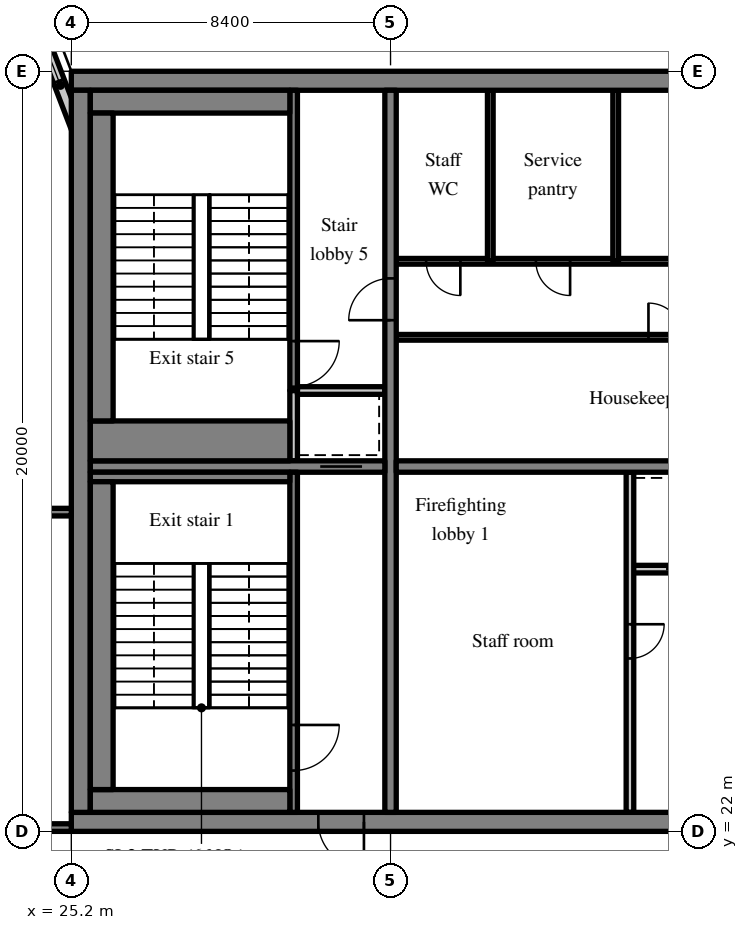
"""IFC4 building model, lengths in metres.
Left out: names, types, materials, properties, quantities, classifications, styles, units other than length and angle.
Written with IfcOpenShell. Run it as: python <this file> out.ifc"""

import sys

from ifc_helpers import new_model, si_unit, direction, frame, frame_2d, origin, place, context, subcontext, project, spatial, rectangle, extrude, source, transform, mapped, element, fill, save


model = new_model("IFC4")
c1 = context("Model", 3, precision=1e-05, world=origin(), true_north=direction((0.0, 1.0)))
c2 = subcontext(c1, "Body", "Model", "MODEL_VIEW")
j1 = project(units=[si_unit("LENGTHUNIT", "METRE"), si_unit("PLANEANGLEUNIT", "RADIAN")], contexts=[c1])
p1 = place(None, origin())
s1 = spatial("IfcSite", under=j1, at=p1, CompositionType="ELEMENT")
p2 = place(p1, origin())
s2 = spatial("IfcBuilding", under=s1, at=p2, CompositionType="ELEMENT")
p3 = place(p2, frame((0.0, 0.0, 281.7)))
s3 = spatial("IfcBuildingStorey", under=s2, at=p3, CompositionType="ELEMENT", Elevation=281.7)
m1 = source(origin(), c2, "Body", "SweptSolid", [
    extrude(rectangle(XDim=50.4, YDim=0.5, at=frame_2d((25.2, 0.0))), origin(), (0.0, 0.0, 1.0), 3.72),
])
p4 = place(p3, frame((25.2, 22.25, 0.0), z_axis=(0.0, 0.0, 1.0), x_axis=(1.0, 0.0, 0.0)))
e1 = element("IfcWall", 1, at=p4, inside=s3, PredefinedType="SHEAR", context=c2, shape_type="MappedRepresentation", body=[
    mapped(m1, transform((0.0, 0.0, 0.0), scale=1.0)),
])
m2 = source(origin(), c2, "Body", "SweptSolid", [
    extrude(rectangle(XDim=1.8, YDim=2.1, at=frame_2d((0.9, 1.05))), frame((0.0, 0.26, 0.0), z_axis=(0.0, -1.0, 0.0), x_axis=(1.0, 0.0, 0.0)), (0.0, 0.0, 1.0), 0.52),
])
p5 = place(p4, frame((15.9, 0.0, 0.0)))
e2 = element("IfcOpeningElement", 2, at=p5, cuts=e1, PredefinedType="OPENING", context=c2, shape_type="MappedRepresentation", body=[
    mapped(m2, transform((0.0, 0.0, 0.0), scale=1.0)),
])
m3 = source(origin(), c2, "Body", "SweptSolid", [
    extrude(rectangle(XDim=0.9, YDim=2.1, at=frame_2d((0.45, 1.05))), frame((0.0, 0.26, 0.0), z_axis=(0.0, -1.0, 0.0), x_axis=(1.0, 0.0, 0.0)), (0.0, 0.0, 1.0), 0.52),
])
p6 = place(p4, frame((21.525, 0.0, 0.0)))
e3 = element("IfcOpeningElement", 3, at=p6, cuts=e1, PredefinedType="OPENING", context=c2, shape_type="MappedRepresentation", body=[
    mapped(m3, transform((0.0, 0.0, 0.0), scale=1.0)),
])
p7 = place(p4, frame((32.7, 0.0, 0.0)))
e4 = element("IfcOpeningElement", 4, at=p7, cuts=e1, PredefinedType="OPENING", context=c2, shape_type="MappedRepresentation", body=[
    mapped(m2, transform((0.0, 0.0, 0.0), scale=1.0)),
])
m4 = source(origin(), c2, "Body", "SweptSolid", [
    extrude(rectangle(XDim=1.2, YDim=2.1, at=frame_2d((0.6, 1.05))), frame((0.0, 0.26, 0.0), z_axis=(0.0, -1.0, 0.0), x_axis=(1.0, 0.0, 0.0)), (0.0, 0.0, 1.0), 0.52),
])
p8 = place(p4, frame((6.5, 0.0, 0.0)))
e5 = element("IfcOpeningElement", 5, at=p8, cuts=e1, PredefinedType="OPENING", context=c2, shape_type="MappedRepresentation", body=[
    mapped(m4, transform((0.0, 0.0, 0.0), scale=1.0)),
])
p9 = place(p4, frame((47.975, 0.0, 0.0)))
e6 = element("IfcOpeningElement", 6, at=p9, cuts=e1, PredefinedType="OPENING", context=c2, shape_type="MappedRepresentation", body=[
    mapped(m4, transform((0.0, 0.0, 0.0), scale=1.0)),
])
p10 = place(p3, frame((25.2, 41.75, 0.0), z_axis=(0.0, 0.0, 1.0), x_axis=(1.0, 0.0, 0.0)))
e7 = element("IfcWall", 7, at=p10, inside=s3, PredefinedType="SHEAR", context=c2, shape_type="MappedRepresentation", body=[
    mapped(m1, transform((0.0, 0.0, 0.0), scale=1.0)),
])
m5 = source(origin(), c2, "Body", "SweptSolid", [
    extrude(rectangle(XDim=19.0, YDim=0.5, at=frame_2d((9.5, 0.0))), origin(), (0.0, 0.0, 1.0), 3.72),
])
p11 = place(p3, frame((25.45, 22.5, 0.0), z_axis=(0.0, 0.0, 1.0), x_axis=(0.0, 1.0, 0.0)))
e8 = element("IfcWall", 8, at=p11, inside=s3, PredefinedType="SHEAR", context=c2, shape_type="MappedRepresentation", body=[
    mapped(m5, transform((0.0, 0.0, 0.0), scale=1.0)),
])
m6 = source(origin(), c2, "Body", "SweptSolid", [
    extrude(rectangle(XDim=19.0, YDim=0.3, at=frame_2d((9.5, 0.0))), origin(), (0.0, 0.0, 1.0), 3.72),
])
p12 = place(p3, frame((33.6, 22.5, 0.0), z_axis=(0.0, 0.0, 1.0), x_axis=(0.0, 1.0, 0.0)))
e9 = element("IfcWall", 9, at=p12, inside=s3, PredefinedType="SHEAR", context=c2, shape_type="MappedRepresentation", body=[
    mapped(m6, transform((0.0, 0.0, 0.0), scale=1.0)),
])
m7 = source(origin(), c2, "Body", "SweptSolid", [
    extrude(rectangle(XDim=1.1, YDim=2.1, at=frame_2d((0.55, 1.05))), frame((0.0, 0.16, 0.0), z_axis=(0.0, -1.0, 0.0), x_axis=(1.0, 0.0, 0.0)), (0.0, 0.0, 1.0), 0.32),
])
p13 = place(p12, frame((12.95, 0.0, 0.0)))
e10 = element("IfcOpeningElement", 10, at=p13, cuts=e9, PredefinedType="OPENING", context=c2, shape_type="MappedRepresentation", body=[
    mapped(m7, transform((0.0, 0.0, 0.0), scale=1.0)),
])
m8 = source(origin(), c2, "Body", "SweptSolid", [
    extrude(rectangle(XDim=7.75, YDim=0.3, at=frame_2d((3.875, 0.0))), origin(), (0.0, 0.0, 1.0), 3.72),
])
p14 = place(p3, frame((25.7, 31.6, 0.0), z_axis=(0.0, 0.0, 1.0), x_axis=(1.0, 0.0, 0.0)))
e11 = element("IfcWall", 11, at=p14, inside=s3, PredefinedType="SHEAR", context=c2, shape_type="MappedRepresentation", body=[
    mapped(m8, transform((0.0, 0.0, 0.0), scale=1.0)),
])
p15 = place(p14, frame((6.05, 0.0, 0.0)))
e12 = element("IfcOpeningElement", 12, at=p15, cuts=e11, PredefinedType="OPENING", context=c2, shape_type="MappedRepresentation", body=[
    mapped(m7, transform((0.0, 0.0, 0.0), scale=1.0)),
])
m9 = source(origin(), c2, "Body", "SweptSolid", [
    extrude(rectangle(XDim=16.5, YDim=0.3, at=frame_2d((8.25, 0.0))), origin(), (0.0, 0.0, 1.0), 3.72),
])
p16 = place(p3, frame((33.75, 31.6, 0.0), z_axis=(0.0, 0.0, 1.0), x_axis=(1.0, 0.0, 0.0)))
e13 = element("IfcWall", 13, at=p16, inside=s3, PredefinedType="SHEAR", context=c2, shape_type="MappedRepresentation", body=[
    mapped(m9, transform((0.0, 0.0, 0.0), scale=1.0)),
])
m10 = source(origin(), c2, "Body", "SweptSolid", [
    extrude(rectangle(XDim=1.0, YDim=2.1, at=frame_2d((0.5, 1.05))), frame((0.0, 0.16, 0.0), z_axis=(0.0, -1.0, 0.0), x_axis=(1.0, 0.0, 0.0)), (0.0, 0.0, 1.0), 0.32),
])
p17 = place(p16, frame((14.875, 0.0, 0.0)))
e14 = element("IfcOpeningElement", 14, at=p17, cuts=e13, PredefinedType="OPENING", context=c2, shape_type="MappedRepresentation", body=[
    mapped(m10, transform((0.0, 0.0, 0.0), scale=1.0)),
])
m11 = source(origin(), c2, "Body", "SweptSolid", [
    extrude(rectangle(XDim=3.559, YDim=0.3, at=frame_2d((1.78, 0.0))), origin(), (0.0, 0.0, 1.0), 3.72),
])
p18 = place(p3, frame((25.55, 39.969, 0.0), z_axis=(0.0, 0.0, 1.0), x_axis=(-0.35779745313, 0.933799219604, 0.0)))
e15 = element("IfcWall", 15, at=p18, inside=s3, PredefinedType="SOLIDWALL", context=c2, shape_type="MappedRepresentation", body=[
    mapped(m11, transform((0.0, 0.0, 0.0), scale=1.0)),
])
m12 = source(origin(), c2, "Body", "SweptSolid", [
    extrude(rectangle(XDim=1.5, YDim=2.0, at=frame_2d((0.75, 1.0))), frame((0.0, 0.16, 0.0), z_axis=(0.0, -1.0, 0.0), x_axis=(1.0, 0.0, 0.0)), (0.0, 0.0, 1.0), 0.32),
])
p19 = place(p18, frame((1.903, 0.0, 0.9)))
e16 = element("IfcOpeningElement", 16, at=p19, cuts=e15, PredefinedType="OPENING", context=c2, shape_type="MappedRepresentation", body=[
    mapped(m12, transform((0.0, 0.0, 0.0), scale=1.0)),
])
m13 = source(origin(), c2, "Body", "SweptSolid", [
    extrude(rectangle(XDim=6.0, YDim=0.2, at=frame_2d((3.0, 0.0))), origin(), (0.0, 0.0, 1.0), 3.72),
])
p20 = place(p3, frame((39.9, 28.9, 0.0), z_axis=(0.0, 0.0, 1.0), x_axis=(1.0, 0.0, 0.0)))
e17 = element("IfcWall", 17, at=p20, inside=s3, PredefinedType="SOLIDWALL", context=c2, shape_type="MappedRepresentation", body=[
    mapped(m13, transform((0.0, 0.0, 0.0), scale=1.0)),
])
m14 = source(origin(), c2, "Body", "SweptSolid", [
    extrude(rectangle(XDim=1.1, YDim=2.1, at=frame_2d((0.55, 1.05))), frame((0.0, 0.11, 0.0), z_axis=(0.0, -1.0, 0.0), x_axis=(1.0, 0.0, 0.0)), (0.0, 0.0, 1.0), 0.22),
])
p21 = place(p20, frame((0.95, 0.0, 0.0)))
e18 = element("IfcOpeningElement", 18, at=p21, cuts=e17, PredefinedType="OPENING", context=c2, shape_type="MappedRepresentation", body=[
    mapped(m14, transform((0.0, 0.0, 0.0), scale=1.0)),
])
p22 = place(p20, frame((3.95, 0.0, 0.0)))
e19 = element("IfcOpeningElement", 19, at=p22, cuts=e17, PredefinedType="OPENING", context=c2, shape_type="MappedRepresentation", body=[
    mapped(m14, transform((0.0, 0.0, 0.0), scale=1.0)),
])
m15 = source(origin(), c2, "Body", "SweptSolid", [
    extrude(rectangle(XDim=8.95, YDim=0.2, at=frame_2d((4.475, 0.0))), origin(), (0.0, 0.0, 1.0), 3.72),
])
p23 = place(p3, frame((39.9, 22.5, 0.0), z_axis=(0.0, 0.0, 1.0), x_axis=(0.0, 1.0, 0.0)))
e20 = element("IfcWall", 20, at=p23, inside=s3, PredefinedType="PARTITIONING", context=c2, shape_type="MappedRepresentation", body=[
    mapped(m15, transform((0.0, 0.0, 0.0), scale=1.0)),
])
m16 = source(origin(), c2, "Body", "SweptSolid", [
    extrude(rectangle(XDim=0.9, YDim=2.1, at=frame_2d((0.45, 1.05))), frame((0.0, 0.11, 0.0), z_axis=(0.0, -1.0, 0.0), x_axis=(1.0, 0.0, 0.0)), (0.0, 0.0, 1.0), 0.22),
])
p24 = place(p23, frame((4.05, 0.0, 0.0)))
e21 = element("IfcOpeningElement", 21, at=p24, cuts=e20, PredefinedType="OPENING", context=c2, shape_type="MappedRepresentation", body=[
    mapped(m16, transform((0.0, 0.0, 0.0), scale=1.0)),
])
m17 = source(origin(), c2, "Body", "SweptSolid", [
    extrude(rectangle(XDim=14.25, YDim=0.15, at=frame_2d((7.125, 0.0))), origin(), (0.0, 0.0, 1.0), 3.72),
])
p25 = place(p3, frame((33.75, 35.0, 0.0), z_axis=(0.0, 0.0, 1.0), x_axis=(1.0, 0.0, 0.0)))
e22 = element("IfcWall", 22, at=p25, inside=s3, PredefinedType="PARTITIONING", context=c2, shape_type="MappedRepresentation", body=[
    mapped(m17, transform((0.0, 0.0, 0.0), scale=1.0)),
])
m18 = source(origin(), c2, "Body", "SweptSolid", [
    extrude(rectangle(XDim=0.9, YDim=2.1, at=frame_2d((0.45, 1.05))), frame((0.0, 0.085, 0.0), z_axis=(0.0, -1.0, 0.0), x_axis=(1.0, 0.0, 0.0)), (0.0, 0.0, 1.0), 0.17),
])
p26 = place(p25, frame((6.637, 0.0, 0.0)))
e23 = element("IfcOpeningElement", 23, at=p26, cuts=e22, PredefinedType="OPENING", context=c2, shape_type="MappedRepresentation", body=[
    mapped(m18, transform((0.0, 0.0, 0.0), scale=1.0)),
])
m19 = source(origin(), c2, "Body", "SweptSolid", [
    extrude(rectangle(XDim=16.5, YDim=0.15, at=frame_2d((8.25, 0.0))), origin(), (0.0, 0.0, 1.0), 3.72),
])
p27 = place(p3, frame((33.75, 37.0, 0.0), z_axis=(0.0, 0.0, 1.0), x_axis=(1.0, 0.0, 0.0)))
e24 = element("IfcWall", 24, at=p27, inside=s3, PredefinedType="PARTITIONING", context=c2, shape_type="MappedRepresentation", body=[
    mapped(m19, transform((0.0, 0.0, 0.0), scale=1.0)),
])
p28 = place(p27, frame((0.787, 0.0, 0.0)))
e25 = element("IfcOpeningElement", 25, at=p28, cuts=e24, PredefinedType="OPENING", context=c2, shape_type="MappedRepresentation", body=[
    mapped(m18, transform((0.0, 0.0, 0.0), scale=1.0)),
])
p29 = place(p27, frame((3.675, 0.0, 0.0)))
e26 = element("IfcOpeningElement", 26, at=p29, cuts=e24, PredefinedType="OPENING", context=c2, shape_type="MappedRepresentation", body=[
    mapped(m18, transform((0.0, 0.0, 0.0), scale=1.0)),
])
p30 = place(p27, frame((9.45, 0.0, 0.0)))
e27 = element("IfcOpeningElement", 27, at=p30, cuts=e24, PredefinedType="OPENING", context=c2, shape_type="MappedRepresentation", body=[
    mapped(m18, transform((0.0, 0.0, 0.0), scale=1.0)),
])
p31 = place(p27, frame((14.813, 0.0, 0.0)))
e28 = element("IfcOpeningElement", 28, at=p31, cuts=e24, PredefinedType="OPENING", context=c2, shape_type="MappedRepresentation", body=[
    mapped(m18, transform((0.0, 0.0, 0.0), scale=1.0)),
])
m20 = source(origin(), c2, "Body", "SweptSolid", [
    extrude(rectangle(XDim=4.5, YDim=0.15, at=frame_2d((2.25, 0.0))), origin(), (0.0, 0.0, 1.0), 3.72),
])
for number, where, z_axis, x_axis in (
    (29, (36.225, 37.0, 0.0), (0.0, 0.0, 1.0), (0.0, 1.0, 0.0)),
    (30, (39.525, 37.0, 0.0), (0.0, 0.0, 1.0), (0.0, 1.0, 0.0)),
):
    element("IfcWall", number, at=place(p3, frame(where, z_axis=z_axis, x_axis=x_axis)), inside=s3, PredefinedType="PARTITIONING", context=c2, shape_type="MappedRepresentation", body=[
        mapped(m20, transform((0.0, 0.0, 0.0), scale=1.0)),
    ])
m21 = source(origin(), c2, "Body", "SweptSolid", [
    extrude(rectangle(XDim=8.95, YDim=0.2, at=frame_2d((4.475, 0.0))), origin(), (0.0, 0.0, 1.0), 3.72),
])
p32 = place(p3, frame((31.05, 22.5, 0.0), z_axis=(0.0, 0.0, 1.0), x_axis=(0.0, 1.0, 0.0)))
e31 = element("IfcWall", 31, at=p32, inside=s3, PredefinedType="SOLIDWALL", context=c2, shape_type="MappedRepresentation", body=[
    mapped(m21, transform((0.0, 0.0, 0.0), scale=1.0)),
])
m22 = source(origin(), c2, "Body", "SweptSolid", [
    extrude(rectangle(XDim=1.2, YDim=2.1, at=frame_2d((0.6, 1.05))), frame((0.0, 0.11, 0.0), z_axis=(0.0, -1.0, 0.0), x_axis=(1.0, 0.0, 0.0)), (0.0, 0.0, 1.0), 0.22),
])
p33 = place(p32, frame((1.1, 0.0, 0.0)))
e32 = element("IfcOpeningElement", 32, at=p33, cuts=e31, PredefinedType="OPENING", context=c2, shape_type="MappedRepresentation", body=[
    mapped(m22, transform((0.0, 0.0, 0.0), scale=1.0)),
])
m23 = source(origin(), c2, "Body", "SweptSolid", [
    extrude(rectangle(XDim=1.85, YDim=0.2, at=frame_2d((0.925, 0.0))), origin(), (0.0, 0.0, 1.0), 3.72),
])
p34 = place(p3, frame((31.05, 31.75, 0.0), z_axis=(0.0, 0.0, 1.0), x_axis=(0.0, 1.0, 0.0)))
e33 = element("IfcWall", 33, at=p34, inside=s3, PredefinedType="SOLIDWALL", context=c2, shape_type="MappedRepresentation", body=[
    mapped(m23, transform((0.0, 0.0, 0.0), scale=1.0)),
])
m24 = source(origin(), c2, "Body", "SweptSolid", [
    extrude(rectangle(XDim=2.3, YDim=0.2, at=frame_2d((1.15, 0.0))), origin(), (0.0, 0.0, 1.0), 3.72),
])
p35 = place(p3, frame((31.15, 33.6, 0.0), z_axis=(0.0, 0.0, 1.0), x_axis=(1.0, 0.0, 0.0)))
e34 = element("IfcWall", 34, at=p35, inside=s3, PredefinedType="SOLIDWALL", context=c2, shape_type="MappedRepresentation", body=[
    mapped(m24, transform((0.0, 0.0, 0.0), scale=1.0)),
])
m25 = source(origin(), c2, "Body", "SweptSolid", [
    extrude(rectangle(XDim=7.9, YDim=0.2, at=frame_2d((3.95, 0.0))), origin(), (0.0, 0.0, 1.0), 3.72),
])
p36 = place(p3, frame((31.05, 33.6, 0.0), z_axis=(0.0, 0.0, 1.0), x_axis=(0.0, 1.0, 0.0)))
e35 = element("IfcWall", 35, at=p36, inside=s3, PredefinedType="SOLIDWALL", context=c2, shape_type="MappedRepresentation", body=[
    mapped(m25, transform((0.0, 0.0, 0.0), scale=1.0)),
])
p37 = place(p36, frame((0.1, 0.0, 0.0)))
e36 = element("IfcOpeningElement", 36, at=p37, cuts=e35, PredefinedType="OPENING", context=c2, shape_type="MappedRepresentation", body=[
    mapped(m22, transform((0.0, 0.0, 0.0), scale=1.0)),
])
m26 = source(origin(), c2, "Body", "SweptSolid", [
    extrude(rectangle(XDim=8.15, YDim=0.2, at=frame_2d((4.075, 0.0))), origin(), (0.0, 0.0, 1.0), 3.72),
])
p38 = place(p3, frame((17.05, 22.1, 0.0), z_axis=(0.0, 0.0, 1.0), x_axis=(1.0, 0.0, 0.0)))
e37 = element("IfcWall", 37, at=p38, inside=s3, PredefinedType="SOLIDWALL", context=c2, shape_type="MappedRepresentation", body=[
    mapped(m26, transform((0.0, 0.0, 0.0), scale=1.0)),
])
p39 = place(p38, frame((5.95, 0.0, 0.0)))
e38 = element("IfcOpeningElement", 38, at=p39, cuts=e37, PredefinedType="OPENING", context=c2, shape_type="MappedRepresentation", body=[
    mapped(m22, transform((0.0, 0.0, 0.0), scale=1.0)),
])
p40 = place(p3, frame((17.05, 30.4, 0.0), z_axis=(0.0, 0.0, 1.0), x_axis=(1.0, 0.0, 0.0)))
e39 = element("IfcWall", 39, at=p40, inside=s3, PredefinedType="SOLIDWALL", context=c2, shape_type="MappedRepresentation", body=[
    mapped(m26, transform((0.0, 0.0, 0.0), scale=1.0)),
])
m27 = source(origin(), c2, "Body", "SweptSolid", [
    extrude(rectangle(XDim=1.0, YDim=2.1, at=frame_2d((0.5, 1.05))), frame((0.0, 0.11, 0.0), z_axis=(0.0, -1.0, 0.0), x_axis=(1.0, 0.0, 0.0)), (0.0, 0.0, 1.0), 0.22),
])
p41 = place(p40, frame((6.05, 0.0, 0.0)))
e40 = element("IfcOpeningElement", 40, at=p41, cuts=e39, PredefinedType="OPENING", context=c2, shape_type="MappedRepresentation", body=[
    mapped(m27, transform((0.0, 0.0, 0.0), scale=1.0)),
])
m28 = source(origin(), c2, "Body", "SweptSolid", [
    extrude(rectangle(XDim=5.25, YDim=0.6, at=frame_2d((2.625, 0.0))), origin(), (0.0, 0.0, 1.0), 3.72),
])
p42 = place(p3, frame((25.7, 22.8, 0.0), z_axis=(0.0, 0.0, 1.0), x_axis=(1.0, 0.0, 0.0)))
e41 = element("IfcWall", 41, at=p42, inside=s3, PredefinedType="SOLIDWALL", context=c2, shape_type="MappedRepresentation", body=[
    mapped(m28, transform((0.0, 0.0, 0.0), scale=1.0)),
])
m29 = source(origin(), c2, "Body", "SweptSolid", [
    extrude(rectangle(XDim=5.25, YDim=0.25, at=frame_2d((2.625, 0.0))), origin(), (0.0, 0.0, 1.0), 3.72),
])
p43 = place(p3, frame((25.7, 31.325, 0.0), z_axis=(0.0, 0.0, 1.0), x_axis=(1.0, 0.0, 0.0)))
e42 = element("IfcWall", 42, at=p43, inside=s3, PredefinedType="SOLIDWALL", context=c2, shape_type="MappedRepresentation", body=[
    mapped(m29, transform((0.0, 0.0, 0.0), scale=1.0)),
])
m30 = source(origin(), c2, "Body", "SweptSolid", [
    extrude(rectangle(XDim=8.1, YDim=0.6, at=frame_2d((4.05, 0.0))), origin(), (0.0, 0.0, 1.0), 3.72),
])
p44 = place(p3, frame((26.0, 23.1, 0.0), z_axis=(0.0, 0.0, 1.0), x_axis=(0.0, 1.0, 0.0)))
e43 = element("IfcWall", 43, at=p44, inside=s3, PredefinedType="SOLIDWALL", context=c2, shape_type="MappedRepresentation", body=[
    mapped(m30, transform((0.0, 0.0, 0.0), scale=1.0)),
])
p45 = place(p3, frame((25.7, 41.2, 0.0), z_axis=(0.0, 0.0, 1.0), x_axis=(1.0, 0.0, 0.0)))
e44 = element("IfcWall", 44, at=p45, inside=s3, PredefinedType="SOLIDWALL", context=c2, shape_type="MappedRepresentation", body=[
    mapped(m28, transform((0.0, 0.0, 0.0), scale=1.0)),
])
m31 = source(origin(), c2, "Body", "SweptSolid", [
    extrude(rectangle(XDim=5.25, YDim=1.05, at=frame_2d((2.625, 0.0))), origin(), (0.0, 0.0, 1.0), 3.72),
])
p46 = place(p3, frame((25.7, 32.275, 0.0), z_axis=(0.0, 0.0, 1.0), x_axis=(1.0, 0.0, 0.0)))
e45 = element("IfcWall", 45, at=p46, inside=s3, PredefinedType="SOLIDWALL", context=c2, shape_type="MappedRepresentation", body=[
    mapped(m31, transform((0.0, 0.0, 0.0), scale=1.0)),
])
p47 = place(p3, frame((26.0, 32.8, 0.0), z_axis=(0.0, 0.0, 1.0), x_axis=(0.0, 1.0, 0.0)))
e46 = element("IfcWall", 46, at=p47, inside=s3, PredefinedType="SOLIDWALL", context=c2, shape_type="MappedRepresentation", body=[
    mapped(m30, transform((0.0, 0.0, 0.0), scale=1.0)),
])
m32 = source(origin(), c2, "Body", "SweptSolid", [
    extrude(rectangle(XDim=1.5, YDim=2.0, at=frame_2d((0.75, 1.0))), frame((0.0, 0.03, 0.0), z_axis=(0.0, -1.0, 0.0), x_axis=(1.0, 0.0, 0.0)), (0.0, 0.0, 1.0), 0.06),
])
p48 = place(p19, origin())
e47 = element("IfcWindow", 47, at=p48, inside=s3, PartitioningType="SINGLE_PANEL", PredefinedType="WINDOW", context=c2, shape_type="MappedRepresentation", body=[
    mapped(m32, transform((0.0, 0.0, 0.0), scale=1.0)),
])
fill(e16, e47)
m33 = source(origin(), c2, "Body", "SweptSolid", [
    extrude(rectangle(XDim=1.1, YDim=2.1, at=frame_2d((0.55, 1.05))), frame((0.0, 0.025, 0.0), z_axis=(0.0, -1.0, 0.0), x_axis=(1.0, 0.0, 0.0)), (0.0, 0.0, 1.0), 0.05),
])
p49 = place(p21, origin())
e48 = element("IfcDoor", 48, at=p49, inside=s3, OperationType="SLIDING_TO_LEFT", PredefinedType="DOOR", context=c2, shape_type="MappedRepresentation", body=[
    mapped(m33, transform((0.0, 0.0, 0.0), scale=1.0)),
])
fill(e18, e48)
m34 = source(origin(), c2, "Body", "SweptSolid", [
    extrude(rectangle(XDim=0.9, YDim=2.1, at=frame_2d((0.45, 1.05))), frame((0.0, 0.025, 0.0), z_axis=(0.0, -1.0, 0.0), x_axis=(1.0, 0.0, 0.0)), (0.0, 0.0, 1.0), 0.05),
])
p50 = place(p24, origin())
e49 = element("IfcDoor", 49, at=p50, inside=s3, OperationType="SINGLE_SWING_RIGHT", PredefinedType="DOOR", context=c2, shape_type="MappedRepresentation", body=[
    mapped(m34, transform((0.0, 0.0, 0.0), scale=1.0)),
])
fill(e21, e49)
p51 = place(p26, origin())
e50 = element("IfcDoor", 50, at=p51, inside=s3, OperationType="SINGLE_SWING_LEFT", PredefinedType="DOOR", context=c2, shape_type="MappedRepresentation", body=[
    mapped(m34, transform((0.0, 0.0, 0.0), scale=1.0)),
])
fill(e23, e50)
p52 = place(p28, origin())
e51 = element("IfcDoor", 51, at=p52, inside=s3, OperationType="SINGLE_SWING_RIGHT", PredefinedType="DOOR", context=c2, shape_type="MappedRepresentation", body=[
    mapped(m34, transform((0.0, 0.0, 0.0), scale=1.0)),
])
fill(e25, e51)
p53 = place(p29, origin())
e52 = element("IfcDoor", 52, at=p53, inside=s3, OperationType="SINGLE_SWING_RIGHT", PredefinedType="DOOR", context=c2, shape_type="MappedRepresentation", body=[
    mapped(m34, transform((0.0, 0.0, 0.0), scale=1.0)),
])
fill(e26, e52)
m35 = source(origin(), c2, "Body", "SweptSolid", [
    extrude(rectangle(XDim=1.2, YDim=2.1, at=frame_2d((0.6, 1.05))), frame((0.0, 0.025, 0.0), z_axis=(0.0, -1.0, 0.0), x_axis=(1.0, 0.0, 0.0)), (0.0, 0.0, 1.0), 0.05),
])
p54 = place(p33, origin())
e53 = element("IfcDoor", 53, at=p54, inside=s3, OperationType="SINGLE_SWING_RIGHT", PredefinedType="DOOR", context=c2, shape_type="MappedRepresentation", body=[
    mapped(m35, transform((0.0, 0.0, 0.0), scale=1.0)),
])
fill(e32, e53)
m36 = source(origin(), c2, "Body", "SweptSolid", [
    extrude(rectangle(XDim=1.2, YDim=2.1, at=frame_2d((0.6, 1.05))), frame((0.0, 0.175, 0.0), z_axis=(0.0, -1.0, 0.0), x_axis=(1.0, 0.0, 0.0)), (0.0, 0.0, 1.0), 0.05),
])
p55 = place(p8, origin())
e54 = element("IfcDoor", 54, at=p55, inside=s3, OperationType="SINGLE_SWING_RIGHT", PredefinedType="DOOR", context=c2, shape_type="MappedRepresentation", body=[
    mapped(m36, transform((0.0, 0.0, 0.0), scale=1.0)),
])
fill(e5, e54)
p56 = place(p15, origin())
e55 = element("IfcDoor", 55, at=p56, inside=s3, OperationType="SLIDING_TO_RIGHT", PredefinedType="DOOR", context=c2, shape_type="MappedRepresentation", body=[
    mapped(m33, transform((0.0, 0.0, 0.0), scale=1.0)),
])
fill(e12, e55)
p57 = place(p37, origin())
e56 = element("IfcDoor", 56, at=p57, inside=s3, OperationType="SINGLE_SWING_RIGHT", PredefinedType="DOOR", context=c2, shape_type="MappedRepresentation", body=[
    mapped(m35, transform((0.0, 0.0, 0.0), scale=1.0)),
])
fill(e36, e56)
p58 = place(p13, origin())
e57 = element("IfcDoor", 57, at=p58, inside=s3, OperationType="SINGLE_SWING_LEFT", PredefinedType="DOOR", context=c2, shape_type="MappedRepresentation", body=[
    mapped(m33, transform((0.0, 0.0, 0.0), scale=1.0)),
])
fill(e10, e57)
save(model, sys.argv[1])
